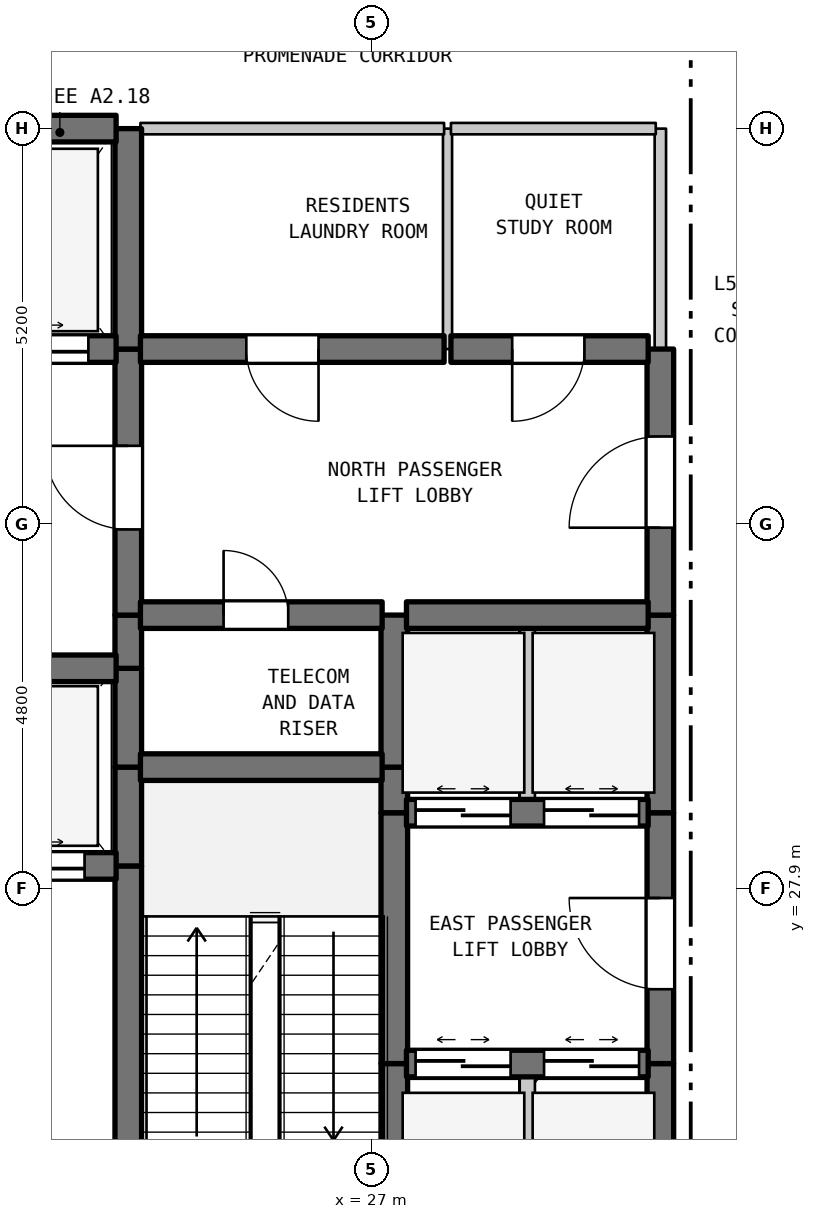
"""IFC4 building model, lengths in metres.
Left out: names, types, materials, properties, quantities, classifications, styles, units other than length and angle.
Written with IfcOpenShell. Run it as: python <this file> out.ifc"""

import sys

from ifc_helpers import new_model, si_unit, direction, frame, frame_2d, origin, place, context, subcontext, project, spatial, rectangle, extrude, element, fill, save


model = new_model("IFC4")
c1 = context("Model", 3, precision=1e-05, world=origin(), true_north=direction((0.0, 1.0)))
c2 = subcontext(c1, "Body", "Model", "MODEL_VIEW")
j1 = project(units=[si_unit("LENGTHUNIT", "METRE"), si_unit("PLANEANGLEUNIT", "RADIAN")], contexts=[c1])
p1 = place(None, origin())
s1 = spatial("IfcSite", under=j1, at=p1, CompositionType="ELEMENT")
p2 = place(p1, origin())
s2 = spatial("IfcBuilding", under=s1, at=p2, CompositionType="ELEMENT")
p3 = place(p2, frame((0.0, 0.0, 218.0)))
s3 = spatial("IfcBuildingStorey", under=s2, at=p3, CompositionType="ELEMENT", Elevation=218.0)
p4 = place(p3, frame((23.8, 22.7, 0.0), z_axis=(0.0, 0.0, 1.0), x_axis=(0.0, 1.0, 0.0)))
e1 = element("IfcWall", 1, at=p4, inside=s3, PredefinedType="SHEAR", context=c2, shape_type="SweptSolid", body=[
    extrude(rectangle(XDim=5.5, YDim=0.35, at=frame_2d((2.75, 0.0))), origin(), (0.0, 0.0, 1.0), 4.49),
])
p5 = place(p4, frame((0.235, 0.0, 0.0)))
e2 = element("IfcOpeningElement", 2, at=p5, cuts=e1, PredefinedType="OPENING", context=c2, shape_type="SweptSolid", body=[
    extrude(rectangle(XDim=1.1, YDim=2.15, at=frame_2d((0.55, 1.075))), frame((0.0, 0.185, 0.0), z_axis=(0.0, -1.0, 0.0), x_axis=(1.0, 0.0, 0.0)), (0.0, 0.0, 1.0), 0.37),
])
for number, where, z_axis, x_axis in (
    (3, (23.8, 28.2, 0.0), (0.0, 0.0, 1.0), (0.0, 1.0, 0.0)),
    (4, (23.8, 29.5, 0.0), (0.0, 0.0, 1.0), (0.0, 1.0, 0.0)),
):
    element("IfcWall", number, at=place(p3, frame(where, z_axis=z_axis, x_axis=x_axis)), inside=s3, PredefinedType="SHEAR", context=c2, shape_type="SweptSolid", body=[
        extrude(rectangle(XDim=1.3, YDim=0.35, at=frame_2d((0.65, 0.0))), origin(), (0.0, 0.0, 1.0), 4.49),
    ])
p6 = place(p3, frame((23.8, 30.8, 0.0), z_axis=(0.0, 0.0, 1.0), x_axis=(0.0, 1.0, 0.0)))
e5 = element("IfcWall", 5, at=p6, inside=s3, PredefinedType="SHEAR", context=c2, shape_type="SweptSolid", body=[
    extrude(rectangle(XDim=0.7, YDim=0.35, at=frame_2d((0.35, 0.0))), origin(), (0.0, 0.0, 1.0), 4.49),
])
p7 = place(p3, frame((23.8, 31.5, 0.0), z_axis=(0.0, 0.0, 1.0), x_axis=(0.0, 1.0, 0.0)))
e6 = element("IfcWall", 6, at=p7, inside=s3, PredefinedType="SHEAR", context=c2, shape_type="SweptSolid", body=[
    extrude(rectangle(XDim=3.5, YDim=0.35, at=frame_2d((1.75, 0.0))), origin(), (0.0, 0.0, 1.0), 4.49),
])
p8 = place(p7, frame((1.127, 0.0, 0.0)))
e7 = element("IfcOpeningElement", 7, at=p8, cuts=e6, PredefinedType="OPENING", context=c2, shape_type="SweptSolid", body=[
    extrude(rectangle(XDim=1.1, YDim=2.15, at=frame_2d((0.55, 1.075))), frame((0.0, 0.185, 0.0), z_axis=(0.0, -1.0, 0.0), x_axis=(1.0, 0.0, 0.0)), (0.0, 0.0, 1.0), 0.37),
])
p9 = place(p3, frame((23.8, 35.0, 0.0), z_axis=(0.0, 0.0, 1.0), x_axis=(0.0, 1.0, 0.0)))
e8 = element("IfcWall", 8, at=p9, inside=s3, PredefinedType="SHEAR", context=c2, shape_type="SweptSolid", body=[
    extrude(rectangle(XDim=2.9, YDim=0.35, at=frame_2d((1.45, 0.0))), origin(), (0.0, 0.0, 1.0), 4.49),
])
p10 = place(p3, frame((27.3, 22.7, 0.0), z_axis=(0.0, 0.0, 1.0), x_axis=(0.0, 1.0, 0.0)))
e9 = element("IfcWall", 9, at=p10, inside=s3, PredefinedType="SHEAR", context=c2, shape_type="SweptSolid", body=[
    extrude(rectangle(XDim=2.9, YDim=0.35, at=frame_2d((1.45, 0.0))), origin(), (0.0, 0.0, 1.0), 4.49),
])
p11 = place(p3, frame((27.3, 25.6, 0.0), z_axis=(0.0, 0.0, 1.0), x_axis=(0.0, 1.0, 0.0)))
e10 = element("IfcWall", 10, at=p11, inside=s3, PredefinedType="SHEAR", context=c2, shape_type="SweptSolid", body=[
    extrude(rectangle(XDim=3.3, YDim=0.35, at=frame_2d((1.65, 0.0))), origin(), (0.0, 0.0, 1.0), 4.49),
])
p12 = place(p3, frame((27.3, 28.9, 0.0), z_axis=(0.0, 0.0, 1.0), x_axis=(0.0, 1.0, 0.0)))
e11 = element("IfcWall", 11, at=p12, inside=s3, PredefinedType="SHEAR", context=c2, shape_type="SweptSolid", body=[
    extrude(rectangle(XDim=0.6, YDim=0.35, at=frame_2d((0.3, 0.0))), origin(), (0.0, 0.0, 1.0), 4.49),
])
p13 = place(p3, frame((27.3, 29.5, 0.0), z_axis=(0.0, 0.0, 1.0), x_axis=(0.0, 1.0, 0.0)))
e12 = element("IfcWall", 12, at=p13, inside=s3, PredefinedType="SHEAR", context=c2, shape_type="SweptSolid", body=[
    extrude(rectangle(XDim=2.0, YDim=0.35, at=frame_2d((1.0, 0.0))), origin(), (0.0, 0.0, 1.0), 4.49),
])
p14 = place(p3, frame((28.0, 35.0, 0.0), z_axis=(0.0, 0.0, 1.0), x_axis=(0.0, 1.0, 0.0)))
e13 = element("IfcWall", 13, at=p14, inside=s3, PredefinedType="PARTITIONING", context=c2, shape_type="SweptSolid", body=[
    extrude(rectangle(XDim=2.9, YDim=0.12, at=frame_2d((1.45, 0.0))), origin(), (0.0, 0.0, 1.0), 4.49),
])
p15 = place(p3, frame((29.05, 22.7, 0.0), z_axis=(0.0, 0.0, 1.0), x_axis=(0.0, 1.0, 0.0)))
e14 = element("IfcWall", 14, at=p15, inside=s3, PredefinedType="STANDARD", context=c2, shape_type="SweptSolid", body=[
    extrude(rectangle(XDim=2.9, YDim=0.2, at=frame_2d((1.45, 0.0))), origin(), (0.0, 0.0, 1.0), 4.49),
])
p16 = place(p3, frame((29.05, 28.9, 0.0), z_axis=(0.0, 0.0, 1.0), x_axis=(0.0, 1.0, 0.0)))
e15 = element("IfcWall", 15, at=p16, inside=s3, PredefinedType="STANDARD", context=c2, shape_type="SweptSolid", body=[
    extrude(rectangle(XDim=2.6, YDim=0.2, at=frame_2d((1.3, 0.0))), origin(), (0.0, 0.0, 1.0), 4.49),
])
p17 = place(p3, frame((30.8, 22.7, 0.0), z_axis=(0.0, 0.0, 1.0), x_axis=(0.0, 1.0, 0.0)))
e16 = element("IfcWall", 16, at=p17, inside=s3, PredefinedType="SHEAR", context=c2, shape_type="SweptSolid", body=[
    extrude(rectangle(XDim=2.9, YDim=0.35, at=frame_2d((1.45, 0.0))), origin(), (0.0, 0.0, 1.0), 4.49),
])
p18 = place(p3, frame((30.8, 25.6, 0.0), z_axis=(0.0, 0.0, 1.0), x_axis=(0.0, 1.0, 0.0)))
e17 = element("IfcWall", 17, at=p18, inside=s3, PredefinedType="SHEAR", context=c2, shape_type="SweptSolid", body=[
    extrude(rectangle(XDim=3.3, YDim=0.35, at=frame_2d((1.65, 0.0))), origin(), (0.0, 0.0, 1.0), 4.49),
])
p19 = place(p18, frame((0.978, 0.0, 0.0)))
e18 = element("IfcOpeningElement", 18, at=p19, cuts=e17, PredefinedType="OPENING", context=c2, shape_type="SweptSolid", body=[
    extrude(rectangle(XDim=1.2, YDim=2.2, at=frame_2d((0.6, 1.1))), frame((0.0, 0.185, 0.0), z_axis=(0.0, -1.0, 0.0), x_axis=(1.0, 0.0, 0.0)), (0.0, 0.0, 1.0), 0.37),
])
p20 = place(p3, frame((30.8, 28.9, 0.0), z_axis=(0.0, 0.0, 1.0), x_axis=(0.0, 1.0, 0.0)))
e19 = element("IfcWall", 19, at=p20, inside=s3, PredefinedType="SHEAR", context=c2, shape_type="SweptSolid", body=[
    extrude(rectangle(XDim=2.6, YDim=0.35, at=frame_2d((1.3, 0.0))), origin(), (0.0, 0.0, 1.0), 4.49),
])
p21 = place(p3, frame((30.8, 31.5, 0.0), z_axis=(0.0, 0.0, 1.0), x_axis=(0.0, 1.0, 0.0)))
e20 = element("IfcWall", 20, at=p21, inside=s3, PredefinedType="SHEAR", context=c2, shape_type="SweptSolid", body=[
    extrude(rectangle(XDim=3.5, YDim=0.35, at=frame_2d((1.75, 0.0))), origin(), (0.0, 0.0, 1.0), 4.49),
])
p22 = place(p21, frame((1.15, 0.0, 0.0)))
e21 = element("IfcOpeningElement", 21, at=p22, cuts=e20, PredefinedType="OPENING", context=c2, shape_type="SweptSolid", body=[
    extrude(rectangle(XDim=1.2, YDim=2.2, at=frame_2d((0.6, 1.1))), frame((0.0, 0.185, 0.0), z_axis=(0.0, -1.0, 0.0), x_axis=(1.0, 0.0, 0.0)), (0.0, 0.0, 1.0), 0.37),
])
p23 = place(p3, frame((30.8, 35.0, 0.0), z_axis=(0.0, 0.0, 1.0), x_axis=(0.0, 1.0, 0.0)))
e22 = element("IfcWall", 22, at=p23, inside=s3, PredefinedType="STANDARD", context=c2, shape_type="SweptSolid", body=[
    extrude(rectangle(XDim=2.9, YDim=0.15, at=frame_2d((1.45, 0.0))), origin(), (0.0, 0.0, 1.0), 4.49),
])
p24 = place(p3, frame((27.46, 25.6, 0.0), z_axis=(0.0, 0.0, 1.0), x_axis=(1.0, 0.0, 0.0)))
e23 = element("IfcWall", 23, at=p24, inside=s3, PredefinedType="SHEAR", context=c2, shape_type="SweptSolid", body=[
    extrude(rectangle(XDim=3.18, YDim=0.35, at=frame_2d((1.59, 0.0))), origin(), (0.0, 0.0, 1.0), 4.49),
])
p25 = place(p24, frame((0.12, 0.0, 0.0)))
e24 = element("IfcOpeningElement", 24, at=p25, cuts=e23, PredefinedType="OPENING", context=c2, shape_type="SweptSolid", body=[
    extrude(rectangle(XDim=1.25, YDim=2.2, at=frame_2d((0.625, 1.1))), frame((0.0, 0.185, 0.0), z_axis=(0.0, -1.0, 0.0), x_axis=(1.0, 0.0, 0.0)), (0.0, 0.0, 1.0), 0.37),
])
p26 = place(p24, frame((1.81, 0.0, 0.0)))
e25 = element("IfcOpeningElement", 25, at=p26, cuts=e23, PredefinedType="OPENING", context=c2, shape_type="SweptSolid", body=[
    extrude(rectangle(XDim=1.25, YDim=2.2, at=frame_2d((0.625, 1.1))), frame((0.0, 0.185, 0.0), z_axis=(0.0, -1.0, 0.0), x_axis=(1.0, 0.0, 0.0)), (0.0, 0.0, 1.0), 0.37),
])
p27 = place(p3, frame((19.16, 28.2, 0.0), z_axis=(0.0, 0.0, 1.0), x_axis=(1.0, 0.0, 0.0)))
e26 = element("IfcWall", 26, at=p27, inside=s3, PredefinedType="SHEAR", context=c2, shape_type="SweptSolid", body=[
    extrude(rectangle(XDim=4.48, YDim=0.35, at=frame_2d((2.24, 0.0))), origin(), (0.0, 0.0, 1.0), 4.49),
])
p28 = place(p27, frame((0.415, 0.0, 0.0)))
e27 = element("IfcOpeningElement", 27, at=p28, cuts=e26, PredefinedType="OPENING", context=c2, shape_type="SweptSolid", body=[
    extrude(rectangle(XDim=1.25, YDim=2.2, at=frame_2d((0.625, 1.1))), frame((0.0, 0.185, 0.0), z_axis=(0.0, -1.0, 0.0), x_axis=(1.0, 0.0, 0.0)), (0.0, 0.0, 1.0), 0.37),
])
p29 = place(p27, frame((2.815, 0.0, 0.0)))
e28 = element("IfcOpeningElement", 28, at=p29, cuts=e26, PredefinedType="OPENING", context=c2, shape_type="SweptSolid", body=[
    extrude(rectangle(XDim=1.25, YDim=2.2, at=frame_2d((0.625, 1.1))), frame((0.0, 0.185, 0.0), z_axis=(0.0, -1.0, 0.0), x_axis=(1.0, 0.0, 0.0)), (0.0, 0.0, 1.0), 0.37),
])
p30 = place(p3, frame((27.46, 28.9, 0.0), z_axis=(0.0, 0.0, 1.0), x_axis=(1.0, 0.0, 0.0)))
e29 = element("IfcWall", 29, at=p30, inside=s3, PredefinedType="SHEAR", context=c2, shape_type="SweptSolid", body=[
    extrude(rectangle(XDim=3.18, YDim=0.35, at=frame_2d((1.59, 0.0))), origin(), (0.0, 0.0, 1.0), 4.49),
])
p31 = place(p30, frame((0.12, 0.0, 0.0)))
e30 = element("IfcOpeningElement", 30, at=p31, cuts=e29, PredefinedType="OPENING", context=c2, shape_type="SweptSolid", body=[
    extrude(rectangle(XDim=1.25, YDim=2.2, at=frame_2d((0.625, 1.1))), frame((0.0, 0.185, 0.0), z_axis=(0.0, -1.0, 0.0), x_axis=(1.0, 0.0, 0.0)), (0.0, 0.0, 1.0), 0.37),
])
p32 = place(p30, frame((1.81, 0.0, 0.0)))
e31 = element("IfcOpeningElement", 31, at=p32, cuts=e29, PredefinedType="OPENING", context=c2, shape_type="SweptSolid", body=[
    extrude(rectangle(XDim=1.25, YDim=2.2, at=frame_2d((0.625, 1.1))), frame((0.0, 0.185, 0.0), z_axis=(0.0, -1.0, 0.0), x_axis=(1.0, 0.0, 0.0)), (0.0, 0.0, 1.0), 0.37),
])
p33 = place(p3, frame((23.96, 29.5, 0.0), z_axis=(0.0, 0.0, 1.0), x_axis=(1.0, 0.0, 0.0)))
e32 = element("IfcWall", 32, at=p33, inside=s3, PredefinedType="SHEAR", context=c2, shape_type="SweptSolid", body=[
    extrude(rectangle(XDim=3.18, YDim=0.35, at=frame_2d((1.59, 0.0))), origin(), (0.0, 0.0, 1.0), 4.49),
])
p34 = place(p3, frame((19.16, 30.8, 0.0), z_axis=(0.0, 0.0, 1.0), x_axis=(1.0, 0.0, 0.0)))
e33 = element("IfcWall", 33, at=p34, inside=s3, PredefinedType="SHEAR", context=c2, shape_type="SweptSolid", body=[
    extrude(rectangle(XDim=4.48, YDim=0.35, at=frame_2d((2.24, 0.0))), origin(), (0.0, 0.0, 1.0), 4.49),
])
p35 = place(p3, frame((23.96, 31.5, 0.0), z_axis=(0.0, 0.0, 1.0), x_axis=(1.0, 0.0, 0.0)))
e34 = element("IfcWall", 34, at=p35, inside=s3, PredefinedType="SHEAR", context=c2, shape_type="SweptSolid", body=[
    extrude(rectangle(XDim=3.18, YDim=0.35, at=frame_2d((1.59, 0.0))), origin(), (0.0, 0.0, 1.0), 4.49),
])
p36 = place(p35, frame((1.094, 0.0, 0.0)))
e35 = element("IfcOpeningElement", 35, at=p36, cuts=e34, PredefinedType="OPENING", context=c2, shape_type="SweptSolid", body=[
    extrude(rectangle(XDim=0.85, YDim=2.1, at=frame_2d((0.425, 1.05))), frame((0.0, 0.185, 0.0), z_axis=(0.0, -1.0, 0.0), x_axis=(1.0, 0.0, 0.0)), (0.0, 0.0, 1.0), 0.37),
])
p37 = place(p3, frame((27.46, 31.5, 0.0), z_axis=(0.0, 0.0, 1.0), x_axis=(1.0, 0.0, 0.0)))
e36 = element("IfcWall", 36, at=p37, inside=s3, PredefinedType="SHEAR", context=c2, shape_type="SweptSolid", body=[
    extrude(rectangle(XDim=3.18, YDim=0.35, at=frame_2d((1.59, 0.0))), origin(), (0.0, 0.0, 1.0), 4.49),
])
p38 = place(p3, frame((19.16, 35.0, 0.0), z_axis=(0.0, 0.0, 1.0), x_axis=(1.0, 0.0, 0.0)))
e37 = element("IfcWall", 37, at=p38, inside=s3, PredefinedType="SHEAR", context=c2, shape_type="SweptSolid", body=[
    extrude(rectangle(XDim=4.48, YDim=0.35, at=frame_2d((2.24, 0.0))), origin(), (0.0, 0.0, 1.0), 4.49),
])
p39 = place(p38, frame((0.365, 0.0, 0.0)))
e38 = element("IfcOpeningElement", 38, at=p39, cuts=e37, PredefinedType="OPENING", context=c2, shape_type="SweptSolid", body=[
    extrude(rectangle(XDim=1.35, YDim=2.2, at=frame_2d((0.675, 1.1))), frame((0.0, 0.185, 0.0), z_axis=(0.0, -1.0, 0.0), x_axis=(1.0, 0.0, 0.0)), (0.0, 0.0, 1.0), 0.37),
])
p40 = place(p38, frame((2.765, 0.0, 0.0)))
e39 = element("IfcOpeningElement", 39, at=p40, cuts=e37, PredefinedType="OPENING", context=c2, shape_type="SweptSolid", body=[
    extrude(rectangle(XDim=1.35, YDim=2.2, at=frame_2d((0.675, 1.1))), frame((0.0, 0.185, 0.0), z_axis=(0.0, -1.0, 0.0), x_axis=(1.0, 0.0, 0.0)), (0.0, 0.0, 1.0), 0.37),
])
p41 = place(p3, frame((23.96, 35.0, 0.0), z_axis=(0.0, 0.0, 1.0), x_axis=(1.0, 0.0, 0.0)))
e40 = element("IfcWall", 40, at=p41, inside=s3, PredefinedType="SHEAR", context=c2, shape_type="SweptSolid", body=[
    extrude(rectangle(XDim=3.995, YDim=0.35, at=frame_2d((1.998, 0.0))), origin(), (0.0, 0.0, 1.0), 4.49),
])
p42 = place(p41, frame((1.393, 0.0, 0.0)))
e41 = element("IfcOpeningElement", 41, at=p42, cuts=e40, PredefinedType="OPENING", context=c2, shape_type="SweptSolid", body=[
    extrude(rectangle(XDim=0.95, YDim=2.15, at=frame_2d((0.475, 1.075))), frame((0.0, 0.185, 0.0), z_axis=(0.0, -1.0, 0.0), x_axis=(1.0, 0.0, 0.0)), (0.0, 0.0, 1.0), 0.37),
])
p43 = place(p3, frame((28.045, 35.0, 0.0), z_axis=(0.0, 0.0, 1.0), x_axis=(1.0, 0.0, 0.0)))
e42 = element("IfcWall", 42, at=p43, inside=s3, PredefinedType="SHEAR", context=c2, shape_type="SweptSolid", body=[
    extrude(rectangle(XDim=2.595, YDim=0.35, at=frame_2d((1.297, 0.0))), origin(), (0.0, 0.0, 1.0), 4.49),
])
p44 = place(p43, frame((0.806, 0.0, 0.0)))
e43 = element("IfcOpeningElement", 43, at=p44, cuts=e42, PredefinedType="OPENING", context=c2, shape_type="SweptSolid", body=[
    extrude(rectangle(XDim=0.95, YDim=2.15, at=frame_2d((0.475, 1.075))), frame((0.0, 0.185, 0.0), z_axis=(0.0, -1.0, 0.0), x_axis=(1.0, 0.0, 0.0)), (0.0, 0.0, 1.0), 0.37),
])
p45 = place(p3, frame((19.16, 37.9, 0.0), z_axis=(0.0, 0.0, 1.0), x_axis=(1.0, 0.0, 0.0)))
e44 = element("IfcWall", 44, at=p45, inside=s3, PredefinedType="SHEAR", context=c2, shape_type="SweptSolid", body=[
    extrude(rectangle(XDim=4.48, YDim=0.35, at=frame_2d((2.24, 0.0))), origin(), (0.0, 0.0, 1.0), 4.49),
])
p46 = place(p3, frame((23.96, 37.9, 0.0), z_axis=(0.0, 0.0, 1.0), x_axis=(1.0, 0.0, 0.0)))
e45 = element("IfcWall", 45, at=p46, inside=s3, PredefinedType="STANDARD", context=c2, shape_type="SweptSolid", body=[
    extrude(rectangle(XDim=3.995, YDim=0.15, at=frame_2d((1.998, 0.0))), origin(), (0.0, 0.0, 1.0), 3.99),
])
p47 = place(p3, frame((28.045, 37.9, 0.0), z_axis=(0.0, 0.0, 1.0), x_axis=(1.0, 0.0, 0.0)))
e46 = element("IfcWall", 46, at=p47, inside=s3, PredefinedType="STANDARD", context=c2, shape_type="SweptSolid", body=[
    extrude(rectangle(XDim=2.695, YDim=0.15, at=frame_2d((1.348, 0.0))), origin(), (0.0, 0.0, 1.0), 3.99),
])
p48 = place(p8, origin())
e47 = element("IfcDoor", 47, at=p48, inside=s3, OperationType="SINGLE_SWING_RIGHT", PredefinedType="DOOR", context=c2, shape_type="SweptSolid", body=[
    extrude(rectangle(XDim=1.1, YDim=2.15, at=frame_2d((0.55, 1.075))), frame((0.0, 0.025, 0.0), z_axis=(0.0, -1.0, 0.0), x_axis=(1.0, 0.0, 0.0)), (0.0, 0.0, 1.0), 0.05),
])
fill(e7, e47)
p49 = place(p19, origin())
e48 = element("IfcDoor", 48, at=p49, inside=s3, OperationType="SINGLE_SWING_RIGHT", PredefinedType="DOOR", context=c2, shape_type="SweptSolid", body=[
    extrude(rectangle(XDim=1.2, YDim=2.2, at=frame_2d((0.6, 1.1))), frame((0.0, 0.025, 0.0), z_axis=(0.0, -1.0, 0.0), x_axis=(1.0, 0.0, 0.0)), (0.0, 0.0, 1.0), 0.05),
])
fill(e18, e48)
p50 = place(p22, origin())
e49 = element("IfcDoor", 49, at=p50, inside=s3, OperationType="SINGLE_SWING_LEFT", PredefinedType="DOOR", context=c2, shape_type="SweptSolid", body=[
    extrude(rectangle(XDim=1.2, YDim=2.2, at=frame_2d((0.6, 1.1))), frame((0.0, 0.025, 0.0), z_axis=(0.0, -1.0, 0.0), x_axis=(1.0, 0.0, 0.0)), (0.0, 0.0, 1.0), 0.05),
])
fill(e21, e49)
p51 = place(p25, origin())
e50 = element("IfcDoor", 50, at=p51, inside=s3, OperationType="DOUBLE_DOOR_SLIDING", PredefinedType="DOOR", context=c2, shape_type="SweptSolid", body=[
    extrude(rectangle(XDim=1.25, YDim=2.2, at=frame_2d((0.625, 1.1))), frame((0.0, 0.025, 0.0), z_axis=(0.0, -1.0, 0.0), x_axis=(1.0, 0.0, 0.0)), (0.0, 0.0, 1.0), 0.05),
])
fill(e24, e50)
p52 = place(p26, origin())
e51 = element("IfcDoor", 51, at=p52, inside=s3, OperationType="DOUBLE_DOOR_SLIDING", PredefinedType="DOOR", context=c2, shape_type="SweptSolid", body=[
    extrude(rectangle(XDim=1.25, YDim=2.2, at=frame_2d((0.625, 1.1))), frame((0.0, 0.025, 0.0), z_axis=(0.0, -1.0, 0.0), x_axis=(1.0, 0.0, 0.0)), (0.0, 0.0, 1.0), 0.05),
])
fill(e25, e51)
p53 = place(p29, origin())
e52 = element("IfcDoor", 52, at=p53, inside=s3, OperationType="DOUBLE_DOOR_SLIDING", PredefinedType="DOOR", context=c2, shape_type="SweptSolid", body=[
    extrude(rectangle(XDim=1.25, YDim=2.2, at=frame_2d((0.625, 1.1))), frame((0.0, 0.025, 0.0), z_axis=(0.0, -1.0, 0.0), x_axis=(1.0, 0.0, 0.0)), (0.0, 0.0, 1.0), 0.05),
])
fill(e28, e52)
p54 = place(p31, origin())
e53 = element("IfcDoor", 53, at=p54, inside=s3, OperationType="DOUBLE_DOOR_SLIDING", PredefinedType="DOOR", context=c2, shape_type="SweptSolid", body=[
    extrude(rectangle(XDim=1.25, YDim=2.2, at=frame_2d((0.625, 1.1))), frame((0.0, 0.025, 0.0), z_axis=(0.0, -1.0, 0.0), x_axis=(1.0, 0.0, 0.0)), (0.0, 0.0, 1.0), 0.05),
])
fill(e30, e53)
p55 = place(p32, origin())
e54 = element("IfcDoor", 54, at=p55, inside=s3, OperationType="DOUBLE_DOOR_SLIDING", PredefinedType="DOOR", context=c2, shape_type="SweptSolid", body=[
    extrude(rectangle(XDim=1.25, YDim=2.2, at=frame_2d((0.625, 1.1))), frame((0.0, 0.025, 0.0), z_axis=(0.0, -1.0, 0.0), x_axis=(1.0, 0.0, 0.0)), (0.0, 0.0, 1.0), 0.05),
])
fill(e31, e54)
p56 = place(p36, origin())
e55 = element("IfcDoor", 55, at=p56, inside=s3, OperationType="SINGLE_SWING_LEFT", PredefinedType="DOOR", context=c2, shape_type="SweptSolid", body=[
    extrude(rectangle(XDim=0.85, YDim=2.1, at=frame_2d((0.425, 1.05))), frame((0.0, 0.025, 0.0), z_axis=(0.0, -1.0, 0.0), x_axis=(1.0, 0.0, 0.0)), (0.0, 0.0, 1.0), 0.05),
])
fill(e35, e55)
p57 = place(p40, origin())
e56 = element("IfcDoor", 56, at=p57, inside=s3, OperationType="DOUBLE_DOOR_SLIDING", PredefinedType="DOOR", context=c2, shape_type="SweptSolid", body=[
    extrude(rectangle(XDim=1.35, YDim=2.2, at=frame_2d((0.675, 1.1))), frame((0.0, 0.025, 0.0), z_axis=(0.0, -1.0, 0.0), x_axis=(1.0, 0.0, 0.0)), (0.0, 0.0, 1.0), 0.05),
])
fill(e39, e56)
p58 = place(p42, frame((0.95, 0.0, 0.0), z_axis=(0.0, 0.0, 1.0), x_axis=(-1.0, 0.0, 0.0)))
e57 = element("IfcDoor", 57, at=p58, inside=s3, OperationType="SINGLE_SWING_RIGHT", PredefinedType="DOOR", context=c2, shape_type="SweptSolid", body=[
    extrude(rectangle(XDim=0.95, YDim=2.15, at=frame_2d((0.475, 1.075))), frame((0.0, 0.025, 0.0), z_axis=(0.0, -1.0, 0.0), x_axis=(1.0, 0.0, 0.0)), (0.0, 0.0, 1.0), 0.05),
])
fill(e41, e57)
p59 = place(p44, frame((0.95, 0.0, 0.0), z_axis=(0.0, 0.0, 1.0), x_axis=(-1.0, 0.0, 0.0)))
e58 = element("IfcDoor", 58, at=p59, inside=s3, OperationType="SINGLE_SWING_LEFT", PredefinedType="DOOR", context=c2, shape_type="SweptSolid", body=[
    extrude(rectangle(XDim=0.95, YDim=2.15, at=frame_2d((0.475, 1.075))), frame((0.0, 0.025, 0.0), z_axis=(0.0, -1.0, 0.0), x_axis=(1.0, 0.0, 0.0)), (0.0, 0.0, 1.0), 0.05),
])
fill(e43, e58)
save(model, sys.argv[1])
